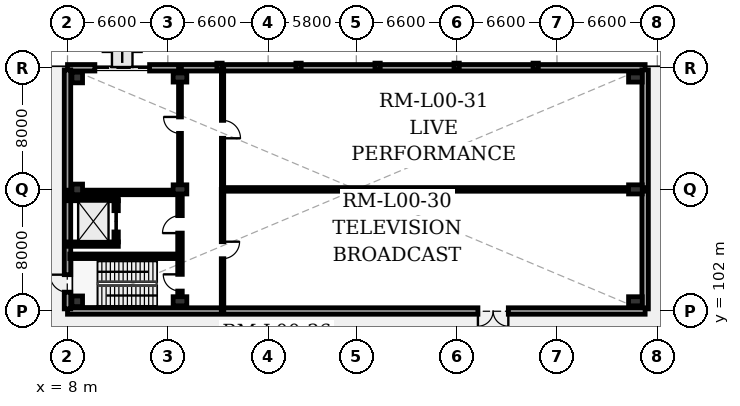
"""IFC4 building model, lengths in metres.
Left out: names, types, materials, properties, quantities, classifications, styles, units other than length and angle.
Written with IfcOpenShell. Run it as: python <this file> out.ifc"""

import sys

from ifc_helpers import new_model, si_unit, direction, frame, frame_2d, origin, origin_2d, place, context, subcontext, project, spatial, rectangle, extrude, element, fill, save


model = new_model("IFC4")
c1 = context("Model", 3, precision=1e-05, world=origin(), true_north=direction((0.0, 1.0)))
c2 = subcontext(c1, "Body", "Model", "MODEL_VIEW")
j1 = project(units=[si_unit("LENGTHUNIT", "METRE"), si_unit("PLANEANGLEUNIT", "RADIAN")], contexts=[c1])
p1 = place(None, origin())
s1 = spatial("IfcSite", under=j1, at=p1, CompositionType="ELEMENT")
p2 = place(p1, origin())
s2 = spatial("IfcBuilding", under=s1, at=p2, CompositionType="ELEMENT")
p3 = place(p2, origin())
s3 = spatial("IfcBuildingStorey", under=s2, at=p3, CompositionType="ELEMENT", Elevation=0.0)
for number, where, z_axis, x_axis in (
    (1, (8.64, 102.64, 0.0), (0.0, 0.0, 1.0), (1.0, 0.0, 0.0)),
    (2, (8.64, 110.0, 0.0), (0.0, 0.0, 1.0), (1.0, 0.0, 0.0)),
    (3, (8.64, 117.36, 0.0), (0.0, 0.0, 1.0), (1.0, 0.0, 0.0)),
):
    element("IfcColumn", number, at=place(p3, frame(where, z_axis=z_axis, x_axis=x_axis)), inside=s3, PredefinedType="COLUMN", context=c2, shape_type="SweptSolid", body=[
        extrude(rectangle(XDim=0.7, YDim=0.7, at=origin_2d()), origin(), (0.0, 0.0, 1.0), 5.4),
    ])
for number, where, z_axis, x_axis in (
    (4, (15.4, 102.64, 0.0), (0.0, 0.0, 1.0), (1.0, 0.0, 0.0)),
    (5, (15.4, 110.0, 0.0), (0.0, 0.0, 1.0), (1.0, 0.0, 0.0)),
    (6, (15.4, 117.36, 0.0), (0.0, 0.0, 1.0), (1.0, 0.0, 0.0)),
    (7, (45.36, 102.64, 0.0), (0.0, 0.0, 1.0), (1.0, 0.0, 0.0)),
    (8, (45.36, 110.0, 0.0), (0.0, 0.0, 1.0), (1.0, 0.0, 0.0)),
    (9, (45.36, 117.36, 0.0), (0.0, 0.0, 1.0), (1.0, 0.0, 0.0)),
):
    element("IfcColumn", number, at=place(p3, frame(where, z_axis=z_axis, x_axis=x_axis)), inside=s3, PredefinedType="COLUMN", context=c2, shape_type="SweptSolid", body=[
        extrude(rectangle(XDim=0.6, YDim=0.9, at=origin_2d()), origin(), (0.0, 0.0, 1.0), 5.4),
    ])
for number, where, z_axis, x_axis in (
    (10, (18.0, 118.08, 0.0), (0.0, 0.0, 1.0), (0.0, 1.0, 0.0)),
    (11, (23.2, 118.08, 0.0), (0.0, 0.0, 1.0), (0.0, 1.0, 0.0)),
    (12, (28.4, 118.08, 0.0), (0.0, 0.0, 1.0), (0.0, 1.0, 0.0)),
    (13, (33.6, 118.08, 0.0), (0.0, 0.0, 1.0), (0.0, 1.0, 0.0)),
    (14, (38.8, 118.08, 0.0), (0.0, 0.0, 1.0), (0.0, 1.0, 0.0)),
):
    element("IfcColumn", number, at=place(p3, frame(where, z_axis=z_axis, x_axis=x_axis)), inside=s3, PredefinedType="PILASTER", context=c2, shape_type="SweptSolid", body=[
        extrude(rectangle(XDim=0.35, YDim=0.45, at=origin_2d()), origin(), (0.0, 0.0, 1.0), 5.4),
    ])
p4 = place(p3, frame((8.0, 118.0, 0.0), z_axis=(0.0, 0.0, 1.0), x_axis=(1.0, 0.0, 0.0)))
e15 = element("IfcWall", 15, at=p4, inside=s3, PredefinedType="SOLIDWALL", context=c2, shape_type="SweptSolid", body=[
    extrude(rectangle(XDim=38.0, YDim=0.425, at=frame_2d((19.0, 0.0))), origin(), (0.0, 0.0, 1.0), 5.15),
])
p5 = place(p4, frame((1.8, 0.0, 0.0)))
e16 = element("IfcOpeningElement", 16, at=p5, cuts=e15, PredefinedType="OPENING", context=c2, shape_type="SweptSolid", body=[
    extrude(rectangle(XDim=3.6, YDim=3.8, at=frame_2d((1.8, 1.9))), frame((0.0, 0.222, 0.0), z_axis=(0.0, -1.0, 0.0), x_axis=(1.0, 0.0, 0.0)), (0.0, 0.0, 1.0), 0.445),
])
p6 = place(p3, frame((46.0, 117.86, 0.0), z_axis=(0.0, 0.0, 1.0), x_axis=(0.0, -1.0, 0.0)))
e17 = element("IfcWall", 17, at=p6, inside=s3, PredefinedType="SOLIDWALL", context=c2, shape_type="SweptSolid", body=[
    extrude(rectangle(XDim=15.72, YDim=0.425, at=frame_2d((7.86, 0.0))), origin(), (0.0, 0.0, 1.0), 5.15),
])
p7 = place(p3, frame((46.0, 102.0, 0.0), z_axis=(0.0, 0.0, 1.0), x_axis=(-1.0, 0.0, 0.0)))
e18 = element("IfcWall", 18, at=p7, inside=s3, PredefinedType="SOLIDWALL", context=c2, shape_type="SweptSolid", body=[
    extrude(rectangle(XDim=38.0, YDim=0.425, at=frame_2d((19.0, 0.0))), origin(), (0.0, 0.0, 1.0), 5.15),
])
p8 = place(p7, frame((9.0, 0.0, 0.0)))
e19 = element("IfcOpeningElement", 19, at=p8, cuts=e18, PredefinedType="OPENING", context=c2, shape_type="SweptSolid", body=[
    extrude(rectangle(XDim=2.0, YDim=2.5, at=frame_2d((1.0, 1.25))), frame((0.0, 0.222, 0.0), z_axis=(0.0, -1.0, 0.0), x_axis=(1.0, 0.0, 0.0)), (0.0, 0.0, 1.0), 0.445),
])
p9 = place(p3, frame((8.0, 102.14, 0.0), z_axis=(0.0, 0.0, 1.0), x_axis=(0.0, 1.0, 0.0)))
e20 = element("IfcWall", 20, at=p9, inside=s3, PredefinedType="SOLIDWALL", context=c2, shape_type="SweptSolid", body=[
    extrude(rectangle(XDim=15.72, YDim=0.425, at=frame_2d((7.86, 0.0))), origin(), (0.0, 0.0, 1.0), 5.15),
])
p10 = place(p9, frame((1.1, 0.0, 0.0)))
e21 = element("IfcOpeningElement", 21, at=p10, cuts=e20, PredefinedType="OPENING", context=c2, shape_type="SweptSolid", body=[
    extrude(rectangle(XDim=1.15, YDim=2.2, at=frame_2d((0.575, 1.1))), frame((0.0, 0.222, 0.0), z_axis=(0.0, -1.0, 0.0), x_axis=(1.0, 0.0, 0.0)), (0.0, 0.0, 1.0), 0.445),
])
p11 = place(p3, frame((7.85, 109.8, 0.0), z_axis=(0.0, 0.0, 1.0), x_axis=(1.0, 0.0, 0.0)))
e22 = element("IfcWall", 22, at=p11, inside=s3, PredefinedType="SHEAR", context=c2, shape_type="SweptSolid", body=[
    extrude(rectangle(XDim=7.248, YDim=0.3, at=frame_2d((3.624, 0.0))), origin(), (0.0, 0.0, 1.0), 5.15),
])
p12 = place(p3, frame((15.4, 103.092, 0.0), z_axis=(0.0, 0.0, 1.0), x_axis=(0.0, 1.0, 0.0)))
e23 = element("IfcWall", 23, at=p12, inside=s3, PredefinedType="SHEAR", context=c2, shape_type="SweptSolid", body=[
    extrude(rectangle(XDim=6.456, YDim=0.3, at=frame_2d((3.228, 0.0))), origin(), (0.0, 0.0, 1.0), 5.15),
])
p13 = place(p12, frame((0.22, 0.0, 0.0)))
e24 = element("IfcOpeningElement", 24, at=p13, cuts=e23, PredefinedType="OPENING", context=c2, shape_type="SweptSolid", body=[
    extrude(rectangle(XDim=1.1, YDim=2.15, at=frame_2d((0.55, 1.075))), frame((0.0, 0.16, 0.0), z_axis=(0.0, -1.0, 0.0), x_axis=(1.0, 0.0, 0.0)), (0.0, 0.0, 1.0), 0.32),
])
p14 = place(p12, frame((4.033, 0.0, 0.0)))
e25 = element("IfcOpeningElement", 25, at=p14, cuts=e23, PredefinedType="OPENING", context=c2, shape_type="SweptSolid", body=[
    extrude(rectangle(XDim=1.15, YDim=2.2, at=frame_2d((0.575, 1.1))), frame((0.0, 0.16, 0.0), z_axis=(0.0, -1.0, 0.0), x_axis=(1.0, 0.0, 0.0)), (0.0, 0.0, 1.0), 0.32),
])
p15 = place(p3, frame((8.15, 105.6, 0.0), z_axis=(0.0, 0.0, 1.0), x_axis=(1.0, 0.0, 0.0)))
e26 = element("IfcWall", 26, at=p15, inside=s3, PredefinedType="SHEAR", context=c2, shape_type="SweptSolid", body=[
    extrude(rectangle(XDim=7.1, YDim=0.3, at=frame_2d((3.55, 0.0))), origin(), (0.0, 0.0, 1.0), 5.15),
])
for number, where, z_axis, x_axis in (
    (27, (8.055, 106.4, 0.0), (0.0, 0.0, 1.0), (1.0, 0.0, 0.0)),
    (28, (8.055, 109.4, 0.0), (0.0, 0.0, 1.0), (1.0, 0.0, 0.0)),
):
    element("IfcWall", number, at=place(p3, frame(where, z_axis=z_axis, x_axis=x_axis)), inside=s3, PredefinedType="SHEAR", context=c2, shape_type="SweptSolid", body=[
        extrude(rectangle(XDim=3.29, YDim=0.29, at=frame_2d((1.645, 0.0))), origin(), (0.0, 0.0, 1.0), 5.15),
    ])
p16 = place(p3, frame((11.2, 106.545, 0.0), z_axis=(0.0, 0.0, 1.0), x_axis=(0.0, 1.0, 0.0)))
e29 = element("IfcWall", 29, at=p16, inside=s3, PredefinedType="SHEAR", context=c2, shape_type="SweptSolid", body=[
    extrude(rectangle(XDim=2.71, YDim=0.29, at=frame_2d((1.355, 0.0))), origin(), (0.0, 0.0, 1.0), 5.15),
])
p17 = place(p16, frame((0.655, 0.0, 0.0)))
e30 = element("IfcOpeningElement", 30, at=p17, cuts=e29, PredefinedType="OPENING", context=c2, shape_type="SweptSolid", body=[
    extrude(rectangle(XDim=1.4, YDim=2.25, at=frame_2d((0.7, 1.125))), frame((0.0, 0.155, 0.0), z_axis=(0.0, -1.0, 0.0), x_axis=(1.0, 0.0, 0.0)), (0.0, 0.0, 1.0), 0.31),
])
p18 = place(p3, frame((15.4, 110.452, 0.0), z_axis=(0.0, 0.0, 1.0), x_axis=(0.0, 1.0, 0.0)))
e31 = element("IfcWall", 31, at=p18, inside=s3, PredefinedType="PARTITIONING", context=c2, shape_type="SweptSolid", body=[
    extrude(rectangle(XDim=7.548, YDim=0.19, at=frame_2d((3.774, 0.0))), origin(), (0.0, 0.0, 1.0), 4.4),
])
p19 = place(p18, frame((3.234, 0.0, 0.0)))
e32 = element("IfcOpeningElement", 32, at=p19, cuts=e31, PredefinedType="OPENING", context=c2, shape_type="SweptSolid", body=[
    extrude(rectangle(XDim=1.08, YDim=2.15, at=frame_2d((0.54, 1.075))), frame((0.0, 0.105, 0.0), z_axis=(0.0, -1.0, 0.0), x_axis=(1.0, 0.0, 0.0)), (0.0, 0.0, 1.0), 0.21),
])
p20 = place(p3, frame((18.2, 110.0, 0.0), z_axis=(0.0, 0.0, 1.0), x_axis=(0.0, -1.0, 0.0)))
e33 = element("IfcWall", 33, at=p20, inside=s3, PredefinedType="PARTITIONING", context=c2, shape_type="SweptSolid", body=[
    extrude(rectangle(XDim=8.0, YDim=0.165, at=frame_2d((4.0, 0.0))), origin(), (0.0, 0.0, 1.0), 5.15),
])
p21 = place(p20, frame((3.44, 0.0, 0.0)))
e34 = element("IfcOpeningElement", 34, at=p21, cuts=e33, PredefinedType="OPENING", context=c2, shape_type="SweptSolid", body=[
    extrude(rectangle(XDim=1.12, YDim=2.15, at=frame_2d((0.56, 1.075))), frame((0.0, 0.093, 0.0), z_axis=(0.0, -1.0, 0.0), x_axis=(1.0, 0.0, 0.0)), (0.0, 0.0, 1.0), 0.185),
])
p22 = place(p3, frame((18.2, 117.903, 0.0), z_axis=(0.0, 0.0, 1.0), x_axis=(0.0, -1.0, 0.0)))
e35 = element("IfcWall", 35, at=p22, inside=s3, PredefinedType="PARTITIONING", context=c2, shape_type="SweptSolid", body=[
    extrude(rectangle(XDim=7.903, YDim=0.15, at=frame_2d((3.952, 0.0))), origin(), (0.0, 0.0, 1.0), 5.15),
])
p23 = place(p22, frame((3.362, 0.0, 0.0)))
e36 = element("IfcOpeningElement", 36, at=p23, cuts=e35, PredefinedType="OPENING", context=c2, shape_type="SweptSolid", body=[
    extrude(rectangle(XDim=1.18, YDim=2.15, at=frame_2d((0.59, 1.075))), frame((0.0, 0.085, 0.0), z_axis=(0.0, -1.0, 0.0), x_axis=(1.0, 0.0, 0.0)), (0.0, 0.0, 1.0), 0.17),
])
p24 = place(p3, frame((18.2, 110.0, 0.0), z_axis=(0.0, 0.0, 1.0), x_axis=(1.0, 0.0, 0.0)))
e37 = element("IfcWall", 37, at=p24, inside=s3, PredefinedType="PARTITIONING", context=c2, shape_type="SweptSolid", body=[
    extrude(rectangle(XDim=27.8, YDim=0.24, at=frame_2d((13.9, 0.0))), origin(), (0.0, 0.0, 1.0), 4.3),
])
p25 = place(p10, origin())
e38 = element("IfcDoor", 38, at=p25, inside=s3, OperationType="SINGLE_SWING_RIGHT", PredefinedType="DOOR", context=c2, shape_type="SweptSolid", body=[
    extrude(rectangle(XDim=1.15, YDim=2.2, at=frame_2d((0.575, 1.1))), frame((0.0, 0.025, 0.0), z_axis=(0.0, -1.0, 0.0), x_axis=(1.0, 0.0, 0.0)), (0.0, 0.0, 1.0), 0.05),
])
fill(e21, e38)
p26 = place(p8, origin())
e39 = element("IfcDoor", 39, at=p26, inside=s3, OperationType="DOUBLE_SWING_LEFT", PredefinedType="DOOR", context=c2, shape_type="SweptSolid", body=[
    extrude(rectangle(XDim=2.0, YDim=2.5, at=frame_2d((1.0, 1.25))), frame((0.0, 0.025, 0.0), z_axis=(0.0, -1.0, 0.0), x_axis=(1.0, 0.0, 0.0)), (0.0, 0.0, 1.0), 0.05),
])
fill(e19, e39)
p27 = place(p5, origin())
e40 = element("IfcDoor", 40, at=p27, inside=s3, OperationType="ROLLINGUP", PredefinedType="GATE", context=c2, shape_type="SweptSolid", body=[
    extrude(rectangle(XDim=3.6, YDim=3.8, at=frame_2d((1.8, 1.9))), frame((0.0, 0.025, 0.0), z_axis=(0.0, -1.0, 0.0), x_axis=(1.0, 0.0, 0.0)), (0.0, 0.0, 1.0), 0.05),
])
fill(e16, e40)
p28 = place(p13, origin())
e41 = element("IfcDoor", 41, at=p28, inside=s3, OperationType="SINGLE_SWING_RIGHT", PredefinedType="DOOR", context=c2, shape_type="SweptSolid", body=[
    extrude(rectangle(XDim=1.1, YDim=2.15, at=frame_2d((0.55, 1.075))), frame((0.0, 0.025, 0.0), z_axis=(0.0, -1.0, 0.0), x_axis=(1.0, 0.0, 0.0)), (0.0, 0.0, 1.0), 0.05),
])
fill(e24, e41)
p29 = place(p14, origin())
e42 = element("IfcDoor", 42, at=p29, inside=s3, OperationType="SINGLE_SWING_LEFT", PredefinedType="DOOR", context=c2, shape_type="SweptSolid", body=[
    extrude(rectangle(XDim=1.15, YDim=2.2, at=frame_2d((0.575, 1.1))), frame((0.0, 0.025, 0.0), z_axis=(0.0, -1.0, 0.0), x_axis=(1.0, 0.0, 0.0)), (0.0, 0.0, 1.0), 0.05),
])
fill(e25, e42)
p30 = place(p17, origin())
e43 = element("IfcDoor", 43, at=p30, inside=s3, OperationType="SLIDING_TO_LEFT", PredefinedType="DOOR", context=c2, shape_type="SweptSolid", body=[
    extrude(rectangle(XDim=1.4, YDim=2.25, at=frame_2d((0.7, 1.125))), frame((0.0, 0.025, 0.0), z_axis=(0.0, -1.0, 0.0), x_axis=(1.0, 0.0, 0.0)), (0.0, 0.0, 1.0), 0.05),
])
fill(e30, e43)
p31 = place(p19, origin())
e44 = element("IfcDoor", 44, at=p31, inside=s3, OperationType="SINGLE_SWING_RIGHT", PredefinedType="DOOR", context=c2, shape_type="SweptSolid", body=[
    extrude(rectangle(XDim=1.08, YDim=2.15, at=frame_2d((0.54, 1.075))), frame((0.0, 0.025, 0.0), z_axis=(0.0, -1.0, 0.0), x_axis=(1.0, 0.0, 0.0)), (0.0, 0.0, 1.0), 0.05),
])
fill(e32, e44)
p32 = place(p21, origin())
e45 = element("IfcDoor", 45, at=p32, inside=s3, OperationType="SINGLE_SWING_LEFT", PredefinedType="DOOR", context=c2, shape_type="SweptSolid", body=[
    extrude(rectangle(XDim=1.12, YDim=2.15, at=frame_2d((0.56, 1.075))), frame((0.0, 0.025, 0.0), z_axis=(0.0, -1.0, 0.0), x_axis=(1.0, 0.0, 0.0)), (0.0, 0.0, 1.0), 0.05),
])
fill(e34, e45)
p33 = place(p23, origin())
e46 = element("IfcDoor", 46, at=p33, inside=s3, OperationType="SINGLE_SWING_RIGHT", PredefinedType="DOOR", context=c2, shape_type="SweptSolid", body=[
    extrude(rectangle(XDim=1.18, YDim=2.15, at=frame_2d((0.59, 1.075))), frame((0.0, 0.025, 0.0), z_axis=(0.0, -1.0, 0.0), x_axis=(1.0, 0.0, 0.0)), (0.0, 0.0, 1.0), 0.05),
])
fill(e36, e46)
save(model, sys.argv[1])
